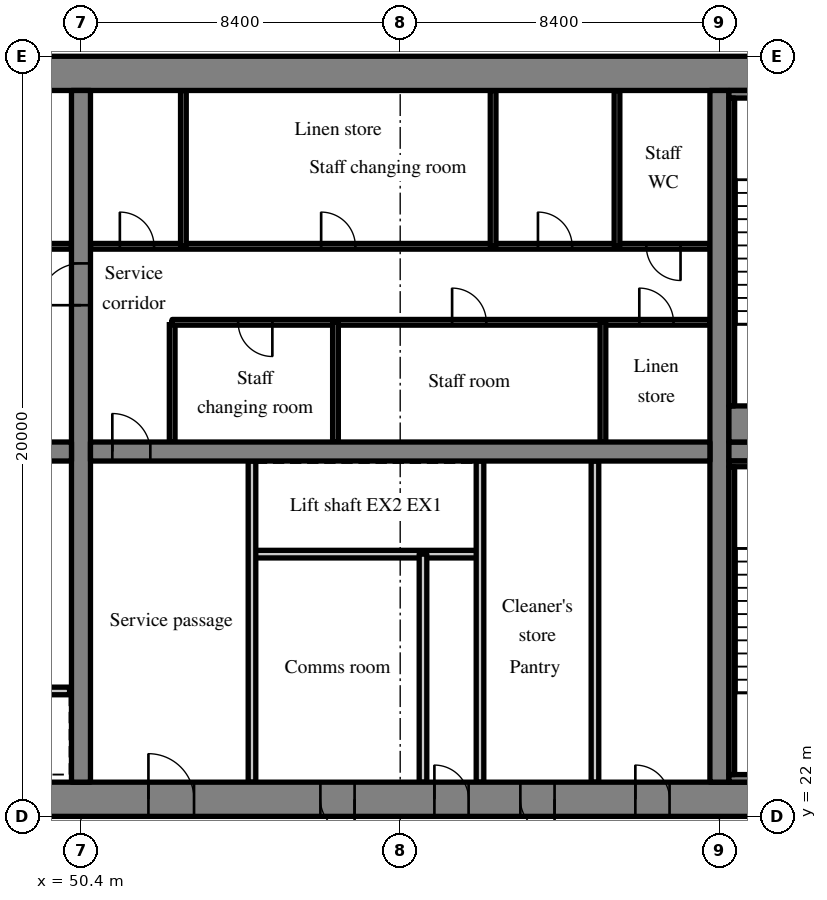
"""IFC4 building model, lengths in metres.
Left out: names, types, materials, properties, quantities, classifications, styles, units other than length and angle.
Written with IfcOpenShell. Run it as: python <this file> out.ifc"""

import sys

from ifc_helpers import new_model, si_unit, direction, frame, frame_2d, origin, place, context, subcontext, project, spatial, rectangle, extrude, source, transform, mapped, element, fill, save


model = new_model("IFC4")
c1 = context("Model", 3, precision=1e-05, world=origin(), true_north=direction((0.0, 1.0)))
c2 = subcontext(c1, "Body", "Model", "MODEL_VIEW")
j1 = project(units=[si_unit("LENGTHUNIT", "METRE"), si_unit("PLANEANGLEUNIT", "RADIAN")], contexts=[c1])
p1 = place(None, origin())
s1 = spatial("IfcSite", under=j1, at=p1, CompositionType="ELEMENT")
p2 = place(p1, origin())
s2 = spatial("IfcBuilding", under=s1, at=p2, CompositionType="ELEMENT")
p3 = place(p2, frame((0.0, 0.0, 91.4)))
s3 = spatial("IfcBuildingStorey", under=s2, at=p3, CompositionType="ELEMENT", Elevation=91.4)
m1 = source(origin(), c2, "Body", "SweptSolid", [
    extrude(rectangle(XDim=50.4, YDim=0.9, at=frame_2d((25.2, 0.0))), origin(), (0.0, 0.0, 1.0), 3.52),
])
p4 = place(p3, frame((25.2, 22.45, 0.0), z_axis=(0.0, 0.0, 1.0), x_axis=(1.0, 0.0, 0.0)))
e1 = element("IfcWall", 1, at=p4, inside=s3, PredefinedType="SHEAR", context=c2, shape_type="MappedRepresentation", body=[
    mapped(m1, transform((0.0, 0.0, 0.0), scale=1.0)),
])
m2 = source(origin(), c2, "Body", "SweptSolid", [
    extrude(rectangle(XDim=1.8, YDim=2.1, at=frame_2d((0.9, 1.05))), frame((0.0, 0.46, 0.0), z_axis=(0.0, -1.0, 0.0), x_axis=(1.0, 0.0, 0.0)), (0.0, 0.0, 1.0), 0.92),
])
p5 = place(p4, frame((15.9, 0.0, 0.0)))
e2 = element("IfcOpeningElement", 2, at=p5, cuts=e1, PredefinedType="OPENING", context=c2, shape_type="MappedRepresentation", body=[
    mapped(m2, transform((0.0, 0.0, 0.0), scale=1.0)),
])
m3 = source(origin(), c2, "Body", "SweptSolid", [
    extrude(rectangle(XDim=1.2, YDim=2.1, at=frame_2d((0.6, 1.05))), frame((0.0, 0.46, 0.0), z_axis=(0.0, -1.0, 0.0), x_axis=(1.0, 0.0, 0.0)), (0.0, 0.0, 1.0), 0.92),
])
p6 = place(p4, frame((26.975, 0.0, 0.0)))
e3 = element("IfcOpeningElement", 3, at=p6, cuts=e1, PredefinedType="OPENING", context=c2, shape_type="MappedRepresentation", body=[
    mapped(m3, transform((0.0, 0.0, 0.0), scale=1.0)),
])
m4 = source(origin(), c2, "Body", "SweptSolid", [
    extrude(rectangle(XDim=0.9, YDim=2.1, at=frame_2d((0.45, 1.05))), frame((0.0, 0.46, 0.0), z_axis=(0.0, -1.0, 0.0), x_axis=(1.0, 0.0, 0.0)), (0.0, 0.0, 1.0), 0.92),
])
p7 = place(p4, frame((34.5, 0.0, 0.0)))
e4 = element("IfcOpeningElement", 4, at=p7, cuts=e1, PredefinedType="OPENING", context=c2, shape_type="MappedRepresentation", body=[
    mapped(m4, transform((0.0, 0.0, 0.0), scale=1.0)),
])
p8 = place(p4, frame((31.5, 0.0, 0.0)))
e5 = element("IfcOpeningElement", 5, at=p8, cuts=e1, PredefinedType="OPENING", context=c2, shape_type="MappedRepresentation", body=[
    mapped(m4, transform((0.0, 0.0, 0.0), scale=1.0)),
])
p9 = place(p4, frame((39.788, 0.0, 0.0)))
e6 = element("IfcOpeningElement", 6, at=p9, cuts=e1, PredefinedType="OPENING", context=c2, shape_type="MappedRepresentation", body=[
    mapped(m4, transform((0.0, 0.0, 0.0), scale=1.0)),
])
p10 = place(p4, frame((36.762, 0.0, 0.0)))
e7 = element("IfcOpeningElement", 7, at=p10, cuts=e1, PredefinedType="OPENING", context=c2, shape_type="MappedRepresentation", body=[
    mapped(m4, transform((0.0, 0.0, 0.0), scale=1.0)),
])
p11 = place(p4, frame((6.45, 0.0, 0.0)))
e8 = element("IfcOpeningElement", 8, at=p11, cuts=e1, PredefinedType="OPENING", context=c2, shape_type="MappedRepresentation", body=[
    mapped(m3, transform((0.0, 0.0, 0.0), scale=1.0)),
])
p12 = place(p4, frame((47.775, 0.0, 0.0)))
e9 = element("IfcOpeningElement", 9, at=p12, cuts=e1, PredefinedType="OPENING", context=c2, shape_type="MappedRepresentation", body=[
    mapped(m3, transform((0.0, 0.0, 0.0), scale=1.0)),
])
p13 = place(p3, frame((25.2, 41.55, 0.0), z_axis=(0.0, 0.0, 1.0), x_axis=(1.0, 0.0, 0.0)))
e10 = element("IfcWall", 10, at=p13, inside=s3, PredefinedType="SHEAR", context=c2, shape_type="MappedRepresentation", body=[
    mapped(m1, transform((0.0, 0.0, 0.0), scale=1.0)),
])
m5 = source(origin(), c2, "Body", "SweptSolid", [
    extrude(rectangle(XDim=18.2, YDim=0.5, at=frame_2d((9.1, 0.0))), origin(), (0.0, 0.0, 1.0), 3.52),
])
p14 = place(p3, frame((50.4, 22.9, 0.0), z_axis=(0.0, 0.0, 1.0), x_axis=(0.0, 1.0, 0.0)))
e11 = element("IfcWall", 11, at=p14, inside=s3, PredefinedType="SHEAR", context=c2, shape_type="MappedRepresentation", body=[
    mapped(m5, transform((0.0, 0.0, 0.0), scale=1.0)),
])
m6 = source(origin(), c2, "Body", "SweptSolid", [
    extrude(rectangle(XDim=1.1, YDim=2.1, at=frame_2d((0.55, 1.05))), frame((0.0, 0.26, 0.0), z_axis=(0.0, -1.0, 0.0), x_axis=(1.0, 0.0, 0.0)), (0.0, 0.0, 1.0), 0.52),
])
p15 = place(p14, frame((12.55, 0.0, 0.0)))
e12 = element("IfcOpeningElement", 12, at=p15, cuts=e11, PredefinedType="OPENING", context=c2, shape_type="MappedRepresentation", body=[
    mapped(m6, transform((0.0, 0.0, 0.0), scale=1.0)),
])
p16 = place(p3, frame((67.2, 22.9, 0.0), z_axis=(0.0, 0.0, 1.0), x_axis=(0.0, 1.0, 0.0)))
e13 = element("IfcWall", 13, at=p16, inside=s3, PredefinedType="SHEAR", context=c2, shape_type="MappedRepresentation", body=[
    mapped(m5, transform((0.0, 0.0, 0.0), scale=1.0)),
])
m7 = source(origin(), c2, "Body", "SweptSolid", [
    extrude(rectangle(XDim=16.3, YDim=0.5, at=frame_2d((8.15, 0.0))), origin(), (0.0, 0.0, 1.0), 3.52),
])
p17 = place(p3, frame((33.85, 31.6, 0.0), z_axis=(0.0, 0.0, 1.0), x_axis=(1.0, 0.0, 0.0)))
e14 = element("IfcWall", 14, at=p17, inside=s3, PredefinedType="SHEAR", context=c2, shape_type="MappedRepresentation", body=[
    mapped(m7, transform((0.0, 0.0, 0.0), scale=1.0)),
])
m8 = source(origin(), c2, "Body", "SweptSolid", [
    extrude(rectangle(XDim=1.0, YDim=2.1, at=frame_2d((0.5, 1.05))), frame((0.0, 0.26, 0.0), z_axis=(0.0, -1.0, 0.0), x_axis=(1.0, 0.0, 0.0)), (0.0, 0.0, 1.0), 0.52),
])
p18 = place(p17, frame((14.725, 0.0, 0.0)))
e15 = element("IfcOpeningElement", 15, at=p18, cuts=e14, PredefinedType="OPENING", context=c2, shape_type="MappedRepresentation", body=[
    mapped(m8, transform((0.0, 0.0, 0.0), scale=1.0)),
])
m9 = source(origin(), c2, "Body", "SweptSolid", [
    extrude(rectangle(XDim=16.3, YDim=0.5, at=frame_2d((8.15, 0.0))), origin(), (0.0, 0.0, 1.0), 3.52),
])
p19 = place(p3, frame((50.65, 31.6, 0.0), z_axis=(0.0, 0.0, 1.0), x_axis=(1.0, 0.0, 0.0)))
e16 = element("IfcWall", 16, at=p19, inside=s3, PredefinedType="SHEAR", context=c2, shape_type="MappedRepresentation", body=[
    mapped(m9, transform((0.0, 0.0, 0.0), scale=1.0)),
])
p20 = place(p19, frame((0.575, 0.0, 0.0)))
e17 = element("IfcOpeningElement", 17, at=p20, cuts=e16, PredefinedType="OPENING", context=c2, shape_type="MappedRepresentation", body=[
    mapped(m8, transform((0.0, 0.0, 0.0), scale=1.0)),
])
m10 = source(origin(), c2, "Body", "SweptSolid", [
    extrude(rectangle(XDim=7.25, YDim=0.5, at=frame_2d((3.625, 0.0))), origin(), (0.0, 0.0, 1.0), 3.52),
])
p21 = place(p3, frame((67.45, 31.6, 0.0), z_axis=(0.0, 0.0, 1.0), x_axis=(1.0, 0.0, 0.0)))
e18 = element("IfcWall", 18, at=p21, inside=s3, PredefinedType="SHEAR", context=c2, shape_type="MappedRepresentation", body=[
    mapped(m10, transform((0.0, 0.0, 0.0), scale=1.0)),
])
p22 = place(p21, frame((5.575, 0.0, 0.0)))
e19 = element("IfcOpeningElement", 19, at=p22, cuts=e18, PredefinedType="OPENING", context=c2, shape_type="MappedRepresentation", body=[
    mapped(m6, transform((0.0, 0.0, 0.0), scale=1.0)),
])
m11 = source(origin(), c2, "Body", "SweptSolid", [
    extrude(rectangle(XDim=6.0, YDim=0.2, at=frame_2d((3.0, 0.0))), origin(), (0.0, 0.0, 1.0), 3.52),
])
p23 = place(p3, frame((44.1, 25.3, 0.0), z_axis=(0.0, 0.0, 1.0), x_axis=(1.0, 0.0, 0.0)))
e20 = element("IfcWall", 20, at=p23, inside=s3, PredefinedType="SOLIDWALL", context=c2, shape_type="MappedRepresentation", body=[
    mapped(m11, transform((0.0, 0.0, 0.0), scale=1.0)),
])
m12 = source(origin(), c2, "Body", "SweptSolid", [
    extrude(rectangle(XDim=1.1, YDim=2.1, at=frame_2d((0.55, 1.05))), frame((0.0, 0.11, 0.0), z_axis=(0.0, -1.0, 0.0), x_axis=(1.0, 0.0, 0.0)), (0.0, 0.0, 1.0), 0.22),
])
p24 = place(p23, frame((0.95, 0.0, 0.0)))
e21 = element("IfcOpeningElement", 21, at=p24, cuts=e20, PredefinedType="OPENING", context=c2, shape_type="MappedRepresentation", body=[
    mapped(m12, transform((0.0, 0.0, 0.0), scale=1.0)),
])
p25 = place(p23, frame((3.95, 0.0, 0.0)))
e22 = element("IfcOpeningElement", 22, at=p25, cuts=e20, PredefinedType="OPENING", context=c2, shape_type="MappedRepresentation", body=[
    mapped(m12, transform((0.0, 0.0, 0.0), scale=1.0)),
])
m13 = source(origin(), c2, "Body", "SweptSolid", [
    extrude(rectangle(XDim=16.3, YDim=0.15, at=frame_2d((8.15, 0.0))), origin(), (0.0, 0.0, 1.0), 3.52),
])
p26 = place(p3, frame((33.85, 37.0, 0.0), z_axis=(0.0, 0.0, 1.0), x_axis=(1.0, 0.0, 0.0)))
e23 = element("IfcWall", 23, at=p26, inside=s3, PredefinedType="PARTITIONING", context=c2, shape_type="MappedRepresentation", body=[
    mapped(m13, transform((0.0, 0.0, 0.0), scale=1.0)),
])
m14 = source(origin(), c2, "Body", "SweptSolid", [
    extrude(rectangle(XDim=0.9, YDim=2.1, at=frame_2d((0.45, 1.05))), frame((0.0, 0.085, 0.0), z_axis=(0.0, -1.0, 0.0), x_axis=(1.0, 0.0, 0.0)), (0.0, 0.0, 1.0), 0.17),
])
p27 = place(p26, frame((3.217, 0.0, 0.0)))
e24 = element("IfcOpeningElement", 24, at=p27, cuts=e23, PredefinedType="OPENING", context=c2, shape_type="MappedRepresentation", body=[
    mapped(m14, transform((0.0, 0.0, 0.0), scale=1.0)),
])
p28 = place(p26, frame((8.107, 0.0, 0.0)))
e25 = element("IfcOpeningElement", 25, at=p28, cuts=e23, PredefinedType="OPENING", context=c2, shape_type="MappedRepresentation", body=[
    mapped(m14, transform((0.0, 0.0, 0.0), scale=1.0)),
])
p29 = place(p26, frame((11.368, 0.0, 0.0)))
e26 = element("IfcOpeningElement", 26, at=p29, cuts=e23, PredefinedType="OPENING", context=c2, shape_type="MappedRepresentation", body=[
    mapped(m14, transform((0.0, 0.0, 0.0), scale=1.0)),
])
p30 = place(p26, frame((14.627, 0.0, 0.0)))
e27 = element("IfcOpeningElement", 27, at=p30, cuts=e23, PredefinedType="OPENING", context=c2, shape_type="MappedRepresentation", body=[
    mapped(m14, transform((0.0, 0.0, 0.0), scale=1.0)),
])
p31 = place(p3, frame((60.9, 28.9, 0.0), z_axis=(0.0, 0.0, 1.0), x_axis=(-1.0, 0.0, 0.0)))
e28 = element("IfcWall", 28, at=p31, inside=s3, PredefinedType="SOLIDWALL", context=c2, shape_type="MappedRepresentation", body=[
    mapped(m11, transform((0.0, 0.0, 0.0), scale=1.0)),
])
m15 = source(origin(), c2, "Body", "SweptSolid", [
    extrude(rectangle(XDim=8.45, YDim=0.2, at=frame_2d((4.225, 0.0))), origin(), (0.0, 0.0, 1.0), 3.52),
])
for number, where, z_axis, x_axis in (
    (29, (54.9, 22.9, 0.0), (0.0, 0.0, 1.0), (0.0, 1.0, 0.0)),
    (30, (60.9, 22.9, 0.0), (0.0, 0.0, 1.0), (0.0, 1.0, 0.0)),
):
    element("IfcWall", number, at=place(p3, frame(where, z_axis=z_axis, x_axis=x_axis)), inside=s3, PredefinedType="PARTITIONING", context=c2, shape_type="MappedRepresentation", body=[
        mapped(m15, transform((0.0, 0.0, 0.0), scale=1.0)),
    ])
p32 = place(p3, frame((59.4, 22.9, 0.0), z_axis=(0.0, 0.0, 1.0), x_axis=(0.0, 1.0, 0.0)))
e31 = element("IfcWall", 31, at=p32, inside=s3, PredefinedType="PARTITIONING", context=c2, shape_type="MappedRepresentation", body=[
    mapped(m11, transform((0.0, 0.0, 0.0), scale=1.0)),
])
p33 = place(p3, frame((63.925, 22.9, 0.0), z_axis=(0.0, 0.0, 1.0), x_axis=(0.0, 1.0, 0.0)))
e32 = element("IfcWall", 32, at=p33, inside=s3, PredefinedType="PARTITIONING", context=c2, shape_type="MappedRepresentation", body=[
    mapped(m15, transform((0.0, 0.0, 0.0), scale=1.0)),
])
m16 = source(origin(), c2, "Body", "SweptSolid", [
    extrude(rectangle(XDim=3.15, YDim=0.15, at=frame_2d((1.575, 0.0))), origin(), (0.0, 0.0, 1.0), 3.52),
])
p34 = place(p3, frame((52.8, 31.85, 0.0), z_axis=(0.0, 0.0, 1.0), x_axis=(0.0, 1.0, 0.0)))
e33 = element("IfcWall", 33, at=p34, inside=s3, PredefinedType="PARTITIONING", context=c2, shape_type="MappedRepresentation", body=[
    mapped(m16, transform((0.0, 0.0, 0.0), scale=1.0)),
])
m17 = source(origin(), c2, "Body", "SweptSolid", [
    extrude(rectangle(XDim=14.15, YDim=0.15, at=frame_2d((7.075, 0.0))), origin(), (0.0, 0.0, 1.0), 3.52),
])
p35 = place(p3, frame((66.95, 35.0, 0.0), z_axis=(0.0, 0.0, 1.0), x_axis=(-1.0, 0.0, 0.0)))
e34 = element("IfcWall", 34, at=p35, inside=s3, PredefinedType="PARTITIONING", context=c2, shape_type="MappedRepresentation", body=[
    mapped(m17, transform((0.0, 0.0, 0.0), scale=1.0)),
])
p36 = place(p35, frame((0.958, 0.0, 0.0)))
e35 = element("IfcOpeningElement", 35, at=p36, cuts=e34, PredefinedType="OPENING", context=c2, shape_type="MappedRepresentation", body=[
    mapped(m14, transform((0.0, 0.0, 0.0), scale=1.0)),
])
p37 = place(p35, frame((5.884, 0.0, 0.0)))
e36 = element("IfcOpeningElement", 36, at=p37, cuts=e34, PredefinedType="OPENING", context=c2, shape_type="MappedRepresentation", body=[
    mapped(m14, transform((0.0, 0.0, 0.0), scale=1.0)),
])
p38 = place(p35, frame((11.514, 0.0, 0.0)))
e37 = element("IfcOpeningElement", 37, at=p38, cuts=e34, PredefinedType="OPENING", context=c2, shape_type="MappedRepresentation", body=[
    mapped(m14, transform((0.0, 0.0, 0.0), scale=1.0)),
])
m18 = source(origin(), c2, "Body", "SweptSolid", [
    extrude(rectangle(XDim=16.3, YDim=0.15, at=frame_2d((8.15, 0.0))), origin(), (0.0, 0.0, 1.0), 3.52),
])
p39 = place(p3, frame((66.95, 37.0, 0.0), z_axis=(0.0, 0.0, 1.0), x_axis=(-1.0, 0.0, 0.0)))
e38 = element("IfcWall", 38, at=p39, inside=s3, PredefinedType="PARTITIONING", context=c2, shape_type="MappedRepresentation", body=[
    mapped(m18, transform((0.0, 0.0, 0.0), scale=1.0)),
])
p40 = place(p39, frame((0.773, 0.0, 0.0)))
e39 = element("IfcOpeningElement", 39, at=p40, cuts=e38, PredefinedType="OPENING", context=c2, shape_type="MappedRepresentation", body=[
    mapped(m14, transform((0.0, 0.0, 0.0), scale=1.0)),
])
p41 = place(p39, frame((3.625, 0.0, 0.0)))
e40 = element("IfcOpeningElement", 40, at=p41, cuts=e38, PredefinedType="OPENING", context=c2, shape_type="MappedRepresentation", body=[
    mapped(m14, transform((0.0, 0.0, 0.0), scale=1.0)),
])
p42 = place(p39, frame((9.33, 0.0, 0.0)))
e41 = element("IfcOpeningElement", 41, at=p42, cuts=e38, PredefinedType="OPENING", context=c2, shape_type="MappedRepresentation", body=[
    mapped(m14, transform((0.0, 0.0, 0.0), scale=1.0)),
])
p43 = place(p39, frame((14.627, 0.0, 0.0)))
e42 = element("IfcOpeningElement", 42, at=p43, cuts=e38, PredefinedType="OPENING", context=c2, shape_type="MappedRepresentation", body=[
    mapped(m14, transform((0.0, 0.0, 0.0), scale=1.0)),
])
for number, where, z_axis, x_axis in (
    (43, (64.135, 31.85, 0.0), (0.0, 0.0, 1.0), (0.0, 1.0, 0.0)),
    (44, (57.097, 31.85, 0.0), (0.0, 0.0, 1.0), (0.0, 1.0, 0.0)),
):
    element("IfcWall", number, at=place(p3, frame(where, z_axis=z_axis, x_axis=x_axis)), inside=s3, PredefinedType="PARTITIONING", context=c2, shape_type="MappedRepresentation", body=[
        mapped(m16, transform((0.0, 0.0, 0.0), scale=1.0)),
    ])
m19 = source(origin(), c2, "Body", "SweptSolid", [
    extrude(rectangle(XDim=4.1, YDim=0.15, at=frame_2d((2.05, 0.0))), origin(), (0.0, 0.0, 1.0), 3.52),
])
for number, where, z_axis, x_axis in (
    (45, (64.505, 37.0, 0.0), (0.0, 0.0, 1.0), (0.0, 1.0, 0.0)),
    (46, (61.245, 37.0, 0.0), (0.0, 0.0, 1.0), (0.0, 1.0, 0.0)),
    (47, (53.095, 37.0, 0.0), (0.0, 0.0, 1.0), (0.0, 1.0, 0.0)),
):
    element("IfcWall", number, at=place(p3, frame(where, z_axis=z_axis, x_axis=x_axis)), inside=s3, PredefinedType="PARTITIONING", context=c2, shape_type="MappedRepresentation", body=[
        mapped(m19, transform((0.0, 0.0, 0.0), scale=1.0)),
    ])
m20 = source(origin(), c2, "Body", "SweptSolid", [
    extrude(rectangle(XDim=4.8, YDim=0.2, at=frame_2d((2.4, 0.0))), origin(), (0.0, 0.0, 1.0), 3.52),
])
p44 = place(p3, frame((67.45, 23.0, 0.0), z_axis=(0.0, 0.0, 1.0), x_axis=(1.0, 0.0, 0.0)))
e48 = element("IfcWall", 48, at=p44, inside=s3, PredefinedType="SOLIDWALL", context=c2, shape_type="MappedRepresentation", body=[
    mapped(m20, transform((0.0, 0.0, 0.0), scale=1.0)),
])
m21 = source(origin(), c2, "Body", "SweptSolid", [
    extrude(rectangle(XDim=4.8, YDim=0.15, at=frame_2d((2.4, 0.0))), origin(), (0.0, 0.0, 1.0), 3.52),
])
p45 = place(p3, frame((67.45, 31.275, 0.0), z_axis=(0.0, 0.0, 1.0), x_axis=(1.0, 0.0, 0.0)))
e49 = element("IfcWall", 49, at=p45, inside=s3, PredefinedType="SOLIDWALL", context=c2, shape_type="MappedRepresentation", body=[
    mapped(m21, transform((0.0, 0.0, 0.0), scale=1.0)),
])
m22 = source(origin(), c2, "Body", "SweptSolid", [
    extrude(rectangle(XDim=8.1, YDim=0.15, at=frame_2d((4.05, 0.0))), origin(), (0.0, 0.0, 1.0), 3.52),
])
p46 = place(p3, frame((67.525, 23.1, 0.0), z_axis=(0.0, 0.0, 1.0), x_axis=(0.0, 1.0, 0.0)))
e50 = element("IfcWall", 50, at=p46, inside=s3, PredefinedType="SOLIDWALL", context=c2, shape_type="MappedRepresentation", body=[
    mapped(m22, transform((0.0, 0.0, 0.0), scale=1.0)),
])
p47 = place(p3, frame((67.45, 41.0, 0.0), z_axis=(0.0, 0.0, 1.0), x_axis=(1.0, 0.0, 0.0)))
e51 = element("IfcWall", 51, at=p47, inside=s3, PredefinedType="SOLIDWALL", context=c2, shape_type="MappedRepresentation", body=[
    mapped(m20, transform((0.0, 0.0, 0.0), scale=1.0)),
])
m23 = source(origin(), c2, "Body", "SweptSolid", [
    extrude(rectangle(XDim=4.8, YDim=0.95, at=frame_2d((2.4, 0.0))), origin(), (0.0, 0.0, 1.0), 3.52),
])
p48 = place(p3, frame((67.45, 32.325, 0.0), z_axis=(0.0, 0.0, 1.0), x_axis=(1.0, 0.0, 0.0)))
e52 = element("IfcWall", 52, at=p48, inside=s3, PredefinedType="SOLIDWALL", context=c2, shape_type="MappedRepresentation", body=[
    mapped(m23, transform((0.0, 0.0, 0.0), scale=1.0)),
])
p49 = place(p3, frame((67.525, 32.8, 0.0), z_axis=(0.0, 0.0, 1.0), x_axis=(0.0, 1.0, 0.0)))
e53 = element("IfcWall", 53, at=p49, inside=s3, PredefinedType="SOLIDWALL", context=c2, shape_type="MappedRepresentation", body=[
    mapped(m22, transform((0.0, 0.0, 0.0), scale=1.0)),
])
m24 = source(origin(), c2, "Body", "SweptSolid", [
    extrude(rectangle(XDim=1.2, YDim=2.1, at=frame_2d((0.6, 1.05))), frame((0.0, 0.375, 0.0), z_axis=(0.0, -1.0, 0.0), x_axis=(1.0, 0.0, 0.0)), (0.0, 0.0, 1.0), 0.05),
])
p50 = place(p6, origin())
e54 = element("IfcDoor", 54, at=p50, inside=s3, OperationType="SINGLE_SWING_LEFT", PredefinedType="DOOR", context=c2, shape_type="MappedRepresentation", body=[
    mapped(m24, transform((0.0, 0.0, 0.0), scale=1.0)),
])
fill(e3, e54)
m25 = source(origin(), c2, "Body", "SweptSolid", [
    extrude(rectangle(XDim=1.0, YDim=2.1, at=frame_2d((0.5, 1.05))), frame((0.0, 0.025, 0.0), z_axis=(0.0, -1.0, 0.0), x_axis=(1.0, 0.0, 0.0)), (0.0, 0.0, 1.0), 0.05),
])
p51 = place(p20, origin())
e55 = element("IfcDoor", 55, at=p51, inside=s3, OperationType="SINGLE_SWING_LEFT", PredefinedType="DOOR", context=c2, shape_type="MappedRepresentation", body=[
    mapped(m25, transform((0.0, 0.0, 0.0), scale=1.0)),
])
fill(e17, e55)
m26 = source(origin(), c2, "Body", "SweptSolid", [
    extrude(rectangle(XDim=0.9, YDim=2.1, at=frame_2d((0.45, 1.05))), frame((0.0, 0.375, 0.0), z_axis=(0.0, -1.0, 0.0), x_axis=(1.0, 0.0, 0.0)), (0.0, 0.0, 1.0), 0.05),
])
p52 = place(p7, origin())
e56 = element("IfcDoor", 56, at=p52, inside=s3, OperationType="SINGLE_SWING_LEFT", PredefinedType="DOOR", context=c2, shape_type="MappedRepresentation", body=[
    mapped(m26, transform((0.0, 0.0, 0.0), scale=1.0)),
])
fill(e4, e56)
p53 = place(p8, origin())
e57 = element("IfcDoor", 57, at=p53, inside=s3, OperationType="SINGLE_SWING_RIGHT", PredefinedType="DOOR", context=c2, shape_type="MappedRepresentation", body=[
    mapped(m26, transform((0.0, 0.0, 0.0), scale=1.0)),
])
fill(e5, e57)
p54 = place(p9, origin())
e58 = element("IfcDoor", 58, at=p54, inside=s3, OperationType="SINGLE_SWING_LEFT", PredefinedType="DOOR", context=c2, shape_type="MappedRepresentation", body=[
    mapped(m26, transform((0.0, 0.0, 0.0), scale=1.0)),
])
fill(e6, e58)
p55 = place(p10, origin())
e59 = element("IfcDoor", 59, at=p55, inside=s3, OperationType="SINGLE_SWING_RIGHT", PredefinedType="DOOR", context=c2, shape_type="MappedRepresentation", body=[
    mapped(m26, transform((0.0, 0.0, 0.0), scale=1.0)),
])
fill(e7, e59)
m27 = source(origin(), c2, "Body", "SweptSolid", [
    extrude(rectangle(XDim=0.9, YDim=2.1, at=frame_2d((0.45, 1.05))), frame((0.0, 0.025, 0.0), z_axis=(0.0, -1.0, 0.0), x_axis=(1.0, 0.0, 0.0)), (0.0, 0.0, 1.0), 0.05),
])
p56 = place(p36, origin())
e60 = element("IfcDoor", 60, at=p56, inside=s3, OperationType="SINGLE_SWING_RIGHT", PredefinedType="DOOR", context=c2, shape_type="MappedRepresentation", body=[
    mapped(m27, transform((0.0, 0.0, 0.0), scale=1.0)),
])
fill(e35, e60)
p57 = place(p37, origin())
e61 = element("IfcDoor", 61, at=p57, inside=s3, OperationType="SINGLE_SWING_RIGHT", PredefinedType="DOOR", context=c2, shape_type="MappedRepresentation", body=[
    mapped(m27, transform((0.0, 0.0, 0.0), scale=1.0)),
])
fill(e36, e61)
p58 = place(p38, origin())
e62 = element("IfcDoor", 62, at=p58, inside=s3, OperationType="SINGLE_SWING_LEFT", PredefinedType="DOOR", context=c2, shape_type="MappedRepresentation", body=[
    mapped(m27, transform((0.0, 0.0, 0.0), scale=1.0)),
])
fill(e37, e62)
p59 = place(p40, origin())
e63 = element("IfcDoor", 63, at=p59, inside=s3, OperationType="SINGLE_SWING_LEFT", PredefinedType="DOOR", context=c2, shape_type="MappedRepresentation", body=[
    mapped(m27, transform((0.0, 0.0, 0.0), scale=1.0)),
])
fill(e39, e63)
p60 = place(p41, origin())
e64 = element("IfcDoor", 64, at=p60, inside=s3, OperationType="SINGLE_SWING_RIGHT", PredefinedType="DOOR", context=c2, shape_type="MappedRepresentation", body=[
    mapped(m27, transform((0.0, 0.0, 0.0), scale=1.0)),
])
fill(e40, e64)
p61 = place(p42, origin())
e65 = element("IfcDoor", 65, at=p61, inside=s3, OperationType="SINGLE_SWING_RIGHT", PredefinedType="DOOR", context=c2, shape_type="MappedRepresentation", body=[
    mapped(m27, transform((0.0, 0.0, 0.0), scale=1.0)),
])
fill(e41, e65)
p62 = place(p43, origin())
e66 = element("IfcDoor", 66, at=p62, inside=s3, OperationType="SINGLE_SWING_RIGHT", PredefinedType="DOOR", context=c2, shape_type="MappedRepresentation", body=[
    mapped(m27, transform((0.0, 0.0, 0.0), scale=1.0)),
])
fill(e42, e66)
m28 = source(origin(), c2, "Body", "SweptSolid", [
    extrude(rectangle(XDim=1.1, YDim=2.1, at=frame_2d((0.55, 1.05))), frame((0.0, 0.025, 0.0), z_axis=(0.0, -1.0, 0.0), x_axis=(1.0, 0.0, 0.0)), (0.0, 0.0, 1.0), 0.05),
])
p63 = place(p15, origin())
e67 = element("IfcDoor", 67, at=p63, inside=s3, OperationType="SINGLE_SWING_LEFT", PredefinedType="DOOR", context=c2, shape_type="MappedRepresentation", body=[
    mapped(m28, transform((0.0, 0.0, 0.0), scale=1.0)),
])
fill(e12, e67)
save(model, sys.argv[1])
